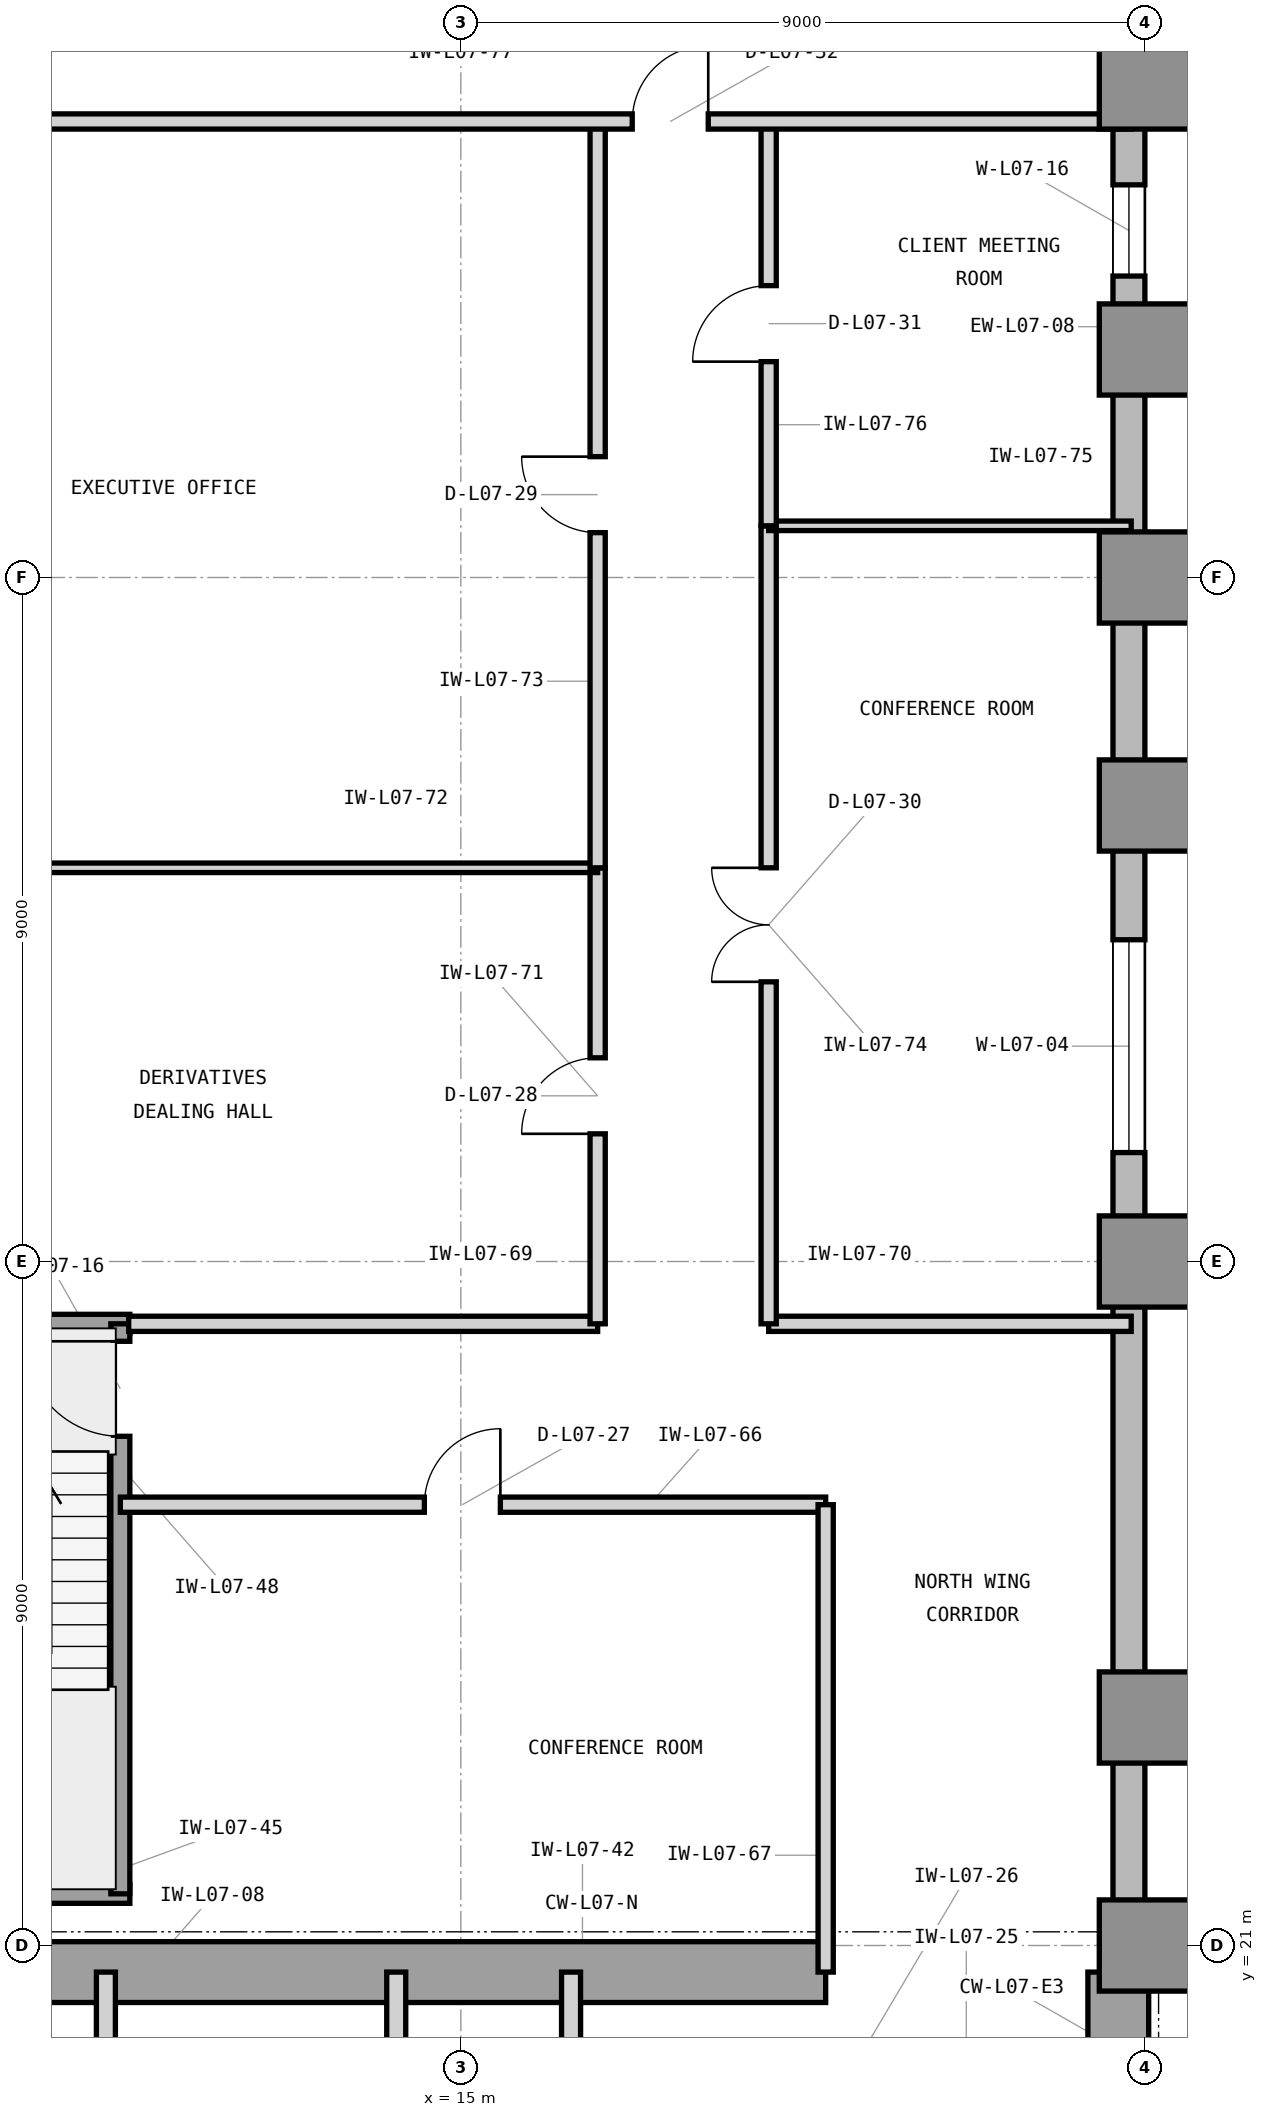
"""IFC4 building model, lengths in metres.
Left out: names, types, materials, properties, quantities, classifications, styles, units other than length and angle.
Written with IfcOpenShell. Run it as: python <this file> out.ifc"""

import sys

from ifc_helpers import new_model, si_unit, direction, frame, frame_2d, origin, origin_2d, place, context, subcontext, project, spatial, rectangle, extrude, element, fill, save


model = new_model("IFC4")
c1 = context("Model", 3, precision=1e-05, world=origin(), true_north=direction((0.0, 1.0)))
c2 = subcontext(c1, "Body", "Model", "MODEL_VIEW")
j1 = project(units=[si_unit("LENGTHUNIT", "METRE"), si_unit("PLANEANGLEUNIT", "RADIAN")], contexts=[c1])
p1 = place(None, origin())
s1 = spatial("IfcSite", under=j1, at=p1, CompositionType="ELEMENT")
p2 = place(p1, origin())
s2 = spatial("IfcBuilding", under=s1, at=p2, CompositionType="ELEMENT")
p3 = place(p2, frame((0.0, 0.0, 34.2)))
s3 = spatial("IfcBuildingStorey", under=s2, at=p3, CompositionType="ELEMENT", Elevation=34.2)
p4 = place(p3, frame((7.475, 20.65, 0.0), z_axis=(0.0, 0.0, 1.0), x_axis=(1.0, 0.0, 0.0)))
e1 = element("IfcWall", 1, at=p4, inside=s3, PredefinedType="SHEAR", context=c2, shape_type="SweptSolid", body=[
    extrude(rectangle(XDim=12.325, YDim=0.8, at=frame_2d((6.163, 0.0))), origin(), (0.0, 0.0, 1.0), 4.2),
])
p5 = place(p3, frame((23.65, 16.6, 0.0), z_axis=(0.0, 0.0, 1.0), x_axis=(0.0, 1.0, 0.0)))
e2 = element("IfcWall", 2, at=p5, inside=s3, PredefinedType="SHEAR", context=c2, shape_type="SweptSolid", body=[
    extrude(rectangle(XDim=4.05, YDim=0.8, at=frame_2d((2.025, 0.0))), origin(), (0.0, 0.0, 1.0), 4.2),
])
for number, where, z_axis, x_axis in (
    (3, (24.0, 21.0, 0.0), (0.0, 0.0, 1.0), (1.0, 0.0, 0.0)),
    (4, (24.0, 24.0, 0.0), (0.0, 0.0, 1.0), (1.0, 0.0, 0.0)),
    (5, (24.0, 30.0, 0.0), (0.0, 0.0, 1.0), (1.0, 0.0, 0.0)),
    (6, (24.0, 36.0, 0.0), (0.0, 0.0, 1.0), (1.0, 0.0, 0.0)),
    (7, (24.0, 39.0, 0.0), (0.0, 0.0, 1.0), (1.0, 0.0, 0.0)),
    (8, (24.0, 42.0, 0.0), (0.0, 0.0, 1.0), (1.0, 0.0, 0.0)),
    (9, (24.0, 45.5, 0.0), (0.0, 0.0, 1.0), (1.0, 0.0, 0.0)),
):
    element("IfcColumn", number, at=place(p3, frame(where, z_axis=z_axis, x_axis=x_axis)), inside=s3, PredefinedType="COLUMN", context=c2, shape_type="SweptSolid", body=[
        extrude(rectangle(XDim=1.2, YDim=1.2, at=origin_2d()), origin(), (0.0, 0.0, 1.0), 4.2),
    ])
p6 = place(p3, frame((64.4, 20.79, 0.0), z_axis=(0.0, 0.0, 1.0), x_axis=(-1.0, 0.0, 0.0)))
e10 = element("IfcWall", 10, at=p6, inside=s3, PredefinedType="STANDARD", context=c2, shape_type="SweptSolid", body=[
    extrude(rectangle(XDim=40.4, YDim=0.42, at=frame_2d((20.2, 0.0))), origin(), (0.0, 0.0, 1.0), 3.98),
])
p7 = place(p6, frame((26.375, 0.0, 0.85)))
e11 = element("IfcOpeningElement", 11, at=p7, cuts=e10, PredefinedType="OPENING", context=c2, shape_type="SweptSolid", body=[
    extrude(rectangle(XDim=2.8, YDim=2.45, at=frame_2d((1.4, 1.225))), frame((0.0, 0.22, 0.0), z_axis=(0.0, -1.0, 0.0), x_axis=(1.0, 0.0, 0.0)), (0.0, 0.0, 1.0), 0.44),
])
p8 = place(p6, frame((38.222, 0.0, 0.85)))
e12 = element("IfcOpeningElement", 12, at=p8, cuts=e10, PredefinedType="OPENING", context=c2, shape_type="SweptSolid", body=[
    extrude(rectangle(XDim=1.2, YDim=2.45, at=frame_2d((0.6, 1.225))), frame((0.0, 0.22, 0.0), z_axis=(0.0, -1.0, 0.0), x_axis=(1.0, 0.0, 0.0)), (0.0, 0.0, 1.0), 0.44),
])
p9 = place(p6, frame((32.536, 0.0, 0.85)))
e13 = element("IfcOpeningElement", 13, at=p9, cuts=e10, PredefinedType="OPENING", context=c2, shape_type="SweptSolid", body=[
    extrude(rectangle(XDim=2.8, YDim=2.45, at=frame_2d((1.4, 1.225))), frame((0.0, 0.22, 0.0), z_axis=(0.0, -1.0, 0.0), x_axis=(1.0, 0.0, 0.0)), (0.0, 0.0, 1.0), 0.44),
])
p10 = place(p6, frame((17.386, 0.0, 0.85)))
e14 = element("IfcOpeningElement", 14, at=p10, cuts=e10, PredefinedType="OPENING", context=c2, shape_type="SweptSolid", body=[
    extrude(rectangle(XDim=2.8, YDim=2.45, at=frame_2d((1.4, 1.225))), frame((0.0, 0.22, 0.0), z_axis=(0.0, -1.0, 0.0), x_axis=(1.0, 0.0, 0.0)), (0.0, 0.0, 1.0), 0.44),
])
p11 = place(p6, frame((8.436, 0.0, 0.85)))
e15 = element("IfcOpeningElement", 15, at=p11, cuts=e10, PredefinedType="OPENING", context=c2, shape_type="SweptSolid", body=[
    extrude(rectangle(XDim=1.2, YDim=2.45, at=frame_2d((0.6, 1.225))), frame((0.0, 0.22, 0.0), z_axis=(0.0, -1.0, 0.0), x_axis=(1.0, 0.0, 0.0)), (0.0, 0.0, 1.0), 0.44),
])
p12 = place(p3, frame((23.79, 21.0, 0.0), z_axis=(0.0, 0.0, 1.0), x_axis=(0.0, 1.0, 0.0)))
e16 = element("IfcWall", 16, at=p12, inside=s3, PredefinedType="STANDARD", context=c2, shape_type="SweptSolid", body=[
    extrude(rectangle(XDim=28.4, YDim=0.42, at=frame_2d((14.2, 0.0))), origin(), (0.0, 0.0, 1.0), 3.98),
])
p13 = place(p12, frame((10.433, 0.0, 0.85)))
e17 = element("IfcOpeningElement", 17, at=p13, cuts=e16, PredefinedType="OPENING", context=c2, shape_type="SweptSolid", body=[
    extrude(rectangle(XDim=2.8, YDim=2.45, at=frame_2d((1.4, 1.225))), frame((0.0, 0.22, 0.0), z_axis=(0.0, -1.0, 0.0), x_axis=(1.0, 0.0, 0.0)), (0.0, 0.0, 1.0), 0.44),
])
p14 = place(p12, frame((21.966, 0.0, 0.85)))
e18 = element("IfcOpeningElement", 18, at=p14, cuts=e16, PredefinedType="OPENING", context=c2, shape_type="SweptSolid", body=[
    extrude(rectangle(XDim=1.2, YDim=2.45, at=frame_2d((0.6, 1.225))), frame((0.0, 0.22, 0.0), z_axis=(0.0, -1.0, 0.0), x_axis=(1.0, 0.0, 0.0)), (0.0, 0.0, 1.0), 0.44),
])
p15 = place(p3, frame((10.33, 19.45, 0.0), z_axis=(0.0, 0.0, 1.0), x_axis=(0.0, 1.0, 0.0)))
e19 = element("IfcWall", 19, at=p15, inside=s3, PredefinedType="PARTITIONING", context=c2, shape_type="SweptSolid", body=[
    extrude(rectangle(XDim=1.2, YDim=0.25, at=frame_2d((0.6, 0.0))), origin(), (0.0, 0.0, 1.0), 3.114),
])
for number, where, z_axis, x_axis in (
    (20, (14.15, 16.7, 0.0), (0.0, 0.0, 1.0), (0.0, 1.0, 0.0)),
    (21, (16.45, 16.7, 0.0), (0.0, 0.0, 1.0), (0.0, 1.0, 0.0)),
):
    element("IfcWall", number, at=place(p3, frame(where, z_axis=z_axis, x_axis=x_axis)), inside=s3, PredefinedType="PARTITIONING", context=c2, shape_type="SweptSolid", body=[
        extrude(rectangle(XDim=3.95, YDim=0.25, at=frame_2d((1.975, 0.0))), origin(), (0.0, 0.0, 1.0), 3.97),
    ])
for number, where, z_axis, x_axis in (
    (22, (6.555, 21.68, 0.0), (0.0, 0.0, 1.0), (1.0, 0.0, 0.0)),
    (23, (6.555, 29.18, 0.0), (0.0, 0.0, 1.0), (1.0, 0.0, 0.0)),
):
    element("IfcWall", number, at=place(p3, frame(where, z_axis=z_axis, x_axis=x_axis)), inside=s3, PredefinedType="SHEAR", context=c2, shape_type="SweptSolid", body=[
        extrude(rectangle(XDim=4.09, YDim=0.25, at=frame_2d((2.045, 0.0))), origin(), (0.0, 0.0, 1.0), 4.2),
    ])
p16 = place(p3, frame((10.52, 21.68, 0.0), z_axis=(0.0, 0.0, 1.0), x_axis=(0.0, 1.0, 0.0)))
e24 = element("IfcWall", 24, at=p16, inside=s3, PredefinedType="SHEAR", context=c2, shape_type="SweptSolid", body=[
    extrude(rectangle(XDim=7.5, YDim=0.25, at=frame_2d((3.75, 0.0))), origin(), (0.0, 0.0, 1.0), 4.2),
])
p17 = place(p16, frame((6.02, 0.0, 0.0)))
e25 = element("IfcOpeningElement", 25, at=p17, cuts=e24, PredefinedType="OPENING", context=c2, shape_type="SweptSolid", body=[
    extrude(rectangle(XDim=1.25, YDim=2.2, at=frame_2d((0.625, 1.1))), frame((0.0, 0.135, 0.0), z_axis=(0.0, -1.0, 0.0), x_axis=(1.0, 0.0, 0.0)), (0.0, 0.0, 1.0), 0.27),
])
p18 = place(p3, frame((10.52, 26.8, 0.0), z_axis=(0.0, 0.0, 1.0), x_axis=(1.0, 0.0, 0.0)))
e26 = element("IfcWall", 26, at=p18, inside=s3, PredefinedType="PARTITIONING", context=c2, shape_type="SweptSolid", body=[
    extrude(rectangle(XDim=9.28, YDim=0.2, at=frame_2d((4.64, 0.0))), origin(), (0.0, 0.0, 1.0), 3.97),
])
p19 = place(p18, frame((4.0, 0.0, 0.0)))
e27 = element("IfcOpeningElement", 27, at=p19, cuts=e26, PredefinedType="OPENING", context=c2, shape_type="SweptSolid", body=[
    extrude(rectangle(XDim=1.0, YDim=2.15, at=frame_2d((0.5, 1.075))), frame((0.0, 0.11, 0.0), z_axis=(0.0, -1.0, 0.0), x_axis=(1.0, 0.0, 0.0)), (0.0, 0.0, 1.0), 0.22),
])
p20 = place(p3, frame((19.8, 20.65, 0.0), z_axis=(0.0, 0.0, 1.0), x_axis=(0.0, 1.0, 0.0)))
e28 = element("IfcWall", 28, at=p20, inside=s3, PredefinedType="PARTITIONING", context=c2, shape_type="SweptSolid", body=[
    extrude(rectangle(XDim=6.15, YDim=0.2, at=frame_2d((3.075, 0.0))), origin(), (0.0, 0.0, 1.0), 3.97),
])
p21 = place(p3, frame((10.63, 29.18, 0.0), z_axis=(0.0, 0.0, 1.0), x_axis=(1.0, 0.0, 0.0)))
e29 = element("IfcWall", 29, at=p21, inside=s3, PredefinedType="PARTITIONING", context=c2, shape_type="SweptSolid", body=[
    extrude(rectangle(XDim=6.17, YDim=0.2, at=frame_2d((3.085, 0.0))), origin(), (0.0, 0.0, 1.0), 3.97),
])
p22 = place(p3, frame((19.05, 29.18, 0.0), z_axis=(0.0, 0.0, 1.0), x_axis=(1.0, 0.0, 0.0)))
e30 = element("IfcWall", 30, at=p22, inside=s3, PredefinedType="PARTITIONING", context=c2, shape_type="SweptSolid", body=[
    extrude(rectangle(XDim=4.77, YDim=0.2, at=frame_2d((2.385, 0.0))), origin(), (0.0, 0.0, 1.0), 3.97),
])
p23 = place(p3, frame((16.8, 29.18, 0.0), z_axis=(0.0, 0.0, 1.0), x_axis=(0.0, 1.0, 0.0)))
e31 = element("IfcWall", 31, at=p23, inside=s3, PredefinedType="PARTITIONING", context=c2, shape_type="SweptSolid", body=[
    extrude(rectangle(XDim=6.0, YDim=0.2, at=frame_2d((3.0, 0.0))), origin(), (0.0, 0.0, 1.0), 3.97),
])
p24 = place(p23, frame((2.5, 0.0, 0.0)))
e32 = element("IfcOpeningElement", 32, at=p24, cuts=e31, PredefinedType="OPENING", context=c2, shape_type="SweptSolid", body=[
    extrude(rectangle(XDim=1.0, YDim=2.15, at=frame_2d((0.5, 1.075))), frame((0.0, 0.11, 0.0), z_axis=(0.0, -1.0, 0.0), x_axis=(1.0, 0.0, 0.0)), (0.0, 0.0, 1.0), 0.22),
])
p25 = place(p3, frame((6.18, 35.18, 0.0), z_axis=(0.0, 0.0, 1.0), x_axis=(1.0, 0.0, 0.0)))
e33 = element("IfcWall", 33, at=p25, inside=s3, PredefinedType="PARTITIONING", context=c2, shape_type="SweptSolid", body=[
    extrude(rectangle(XDim=10.62, YDim=0.125, at=frame_2d((5.31, 0.0))), origin(), (0.0, 0.0, 1.0), 3.97),
])
p26 = place(p3, frame((16.8, 35.18, 0.0), z_axis=(0.0, 0.0, 1.0), x_axis=(0.0, 1.0, 0.0)))
e34 = element("IfcWall", 34, at=p26, inside=s3, PredefinedType="PARTITIONING", context=c2, shape_type="SweptSolid", body=[
    extrude(rectangle(XDim=9.82, YDim=0.2, at=frame_2d((4.91, 0.0))), origin(), (0.0, 0.0, 1.0), 3.97),
])
p27 = place(p26, frame((4.41, 0.0, 0.0)))
e35 = element("IfcOpeningElement", 35, at=p27, cuts=e34, PredefinedType="OPENING", context=c2, shape_type="SweptSolid", body=[
    extrude(rectangle(XDim=1.0, YDim=2.15, at=frame_2d((0.5, 1.075))), frame((0.0, 0.11, 0.0), z_axis=(0.0, -1.0, 0.0), x_axis=(1.0, 0.0, 0.0)), (0.0, 0.0, 1.0), 0.22),
])
p28 = place(p3, frame((19.05, 29.18, 0.0), z_axis=(0.0, 0.0, 1.0), x_axis=(0.0, 1.0, 0.0)))
e36 = element("IfcWall", 36, at=p28, inside=s3, PredefinedType="PARTITIONING", context=c2, shape_type="SweptSolid", body=[
    extrude(rectangle(XDim=10.5, YDim=0.2, at=frame_2d((5.25, 0.0))), origin(), (0.0, 0.0, 1.0), 3.97),
])
p29 = place(p28, frame((4.5, 0.0, 0.0)))
e37 = element("IfcOpeningElement", 37, at=p29, cuts=e36, PredefinedType="OPENING", context=c2, shape_type="SweptSolid", body=[
    extrude(rectangle(XDim=1.5, YDim=2.3, at=frame_2d((0.75, 1.15))), frame((0.0, 0.11, 0.0), z_axis=(0.0, -1.0, 0.0), x_axis=(1.0, 0.0, 0.0)), (0.0, 0.0, 1.0), 0.22),
])
p30 = place(p3, frame((19.05, 39.68, 0.0), z_axis=(0.0, 0.0, 1.0), x_axis=(1.0, 0.0, 0.0)))
e38 = element("IfcWall", 38, at=p30, inside=s3, PredefinedType="PARTITIONING", context=c2, shape_type="SweptSolid", body=[
    extrude(rectangle(XDim=4.77, YDim=0.125, at=frame_2d((2.385, 0.0))), origin(), (0.0, 0.0, 1.0), 3.97),
])
p31 = place(p3, frame((19.05, 39.68, 0.0), z_axis=(0.0, 0.0, 1.0), x_axis=(0.0, 1.0, 0.0)))
e39 = element("IfcWall", 39, at=p31, inside=s3, PredefinedType="PARTITIONING", context=c2, shape_type="SweptSolid", body=[
    extrude(rectangle(XDim=5.32, YDim=0.2, at=frame_2d((2.66, 0.0))), origin(), (0.0, 0.0, 1.0), 3.97),
])
p32 = place(p31, frame((2.16, 0.0, 0.0)))
e40 = element("IfcOpeningElement", 40, at=p32, cuts=e39, PredefinedType="OPENING", context=c2, shape_type="SweptSolid", body=[
    extrude(rectangle(XDim=1.0, YDim=2.15, at=frame_2d((0.5, 1.075))), frame((0.0, 0.11, 0.0), z_axis=(0.0, -1.0, 0.0), x_axis=(1.0, 0.0, 0.0)), (0.0, 0.0, 1.0), 0.22),
])
p33 = place(p3, frame((6.18, 45.0, 0.0), z_axis=(0.0, 0.0, 1.0), x_axis=(1.0, 0.0, 0.0)))
e41 = element("IfcWall", 41, at=p33, inside=s3, PredefinedType="PARTITIONING", context=c2, shape_type="SweptSolid", body=[
    extrude(rectangle(XDim=17.64, YDim=0.2, at=frame_2d((8.82, 0.0))), origin(), (0.0, 0.0, 1.0), 3.97),
])
p34 = place(p33, frame((11.075, 0.0, 0.0)))
e42 = element("IfcOpeningElement", 42, at=p34, cuts=e41, PredefinedType="OPENING", context=c2, shape_type="SweptSolid", body=[
    extrude(rectangle(XDim=1.0, YDim=2.15, at=frame_2d((0.5, 1.075))), frame((0.0, 0.11, 0.0), z_axis=(0.0, -1.0, 0.0), x_axis=(1.0, 0.0, 0.0)), (0.0, 0.0, 1.0), 0.22),
])
p35 = place(p13, origin())
e43 = element("IfcWindow", 43, at=p35, inside=s3, PartitioningType="SINGLE_PANEL", PredefinedType="WINDOW", context=c2, shape_type="SweptSolid", body=[
    extrude(rectangle(XDim=2.8, YDim=2.45, at=frame_2d((1.4, 1.225))), frame((0.0, 0.11, 0.0), z_axis=(0.0, -1.0, 0.0), x_axis=(1.0, 0.0, 0.0)), (0.0, 0.0, 1.0), 0.06),
])
fill(e17, e43)
p36 = place(p17, origin())
e44 = element("IfcDoor", 44, at=p36, inside=s3, OperationType="SINGLE_SWING_RIGHT", PredefinedType="DOOR", context=c2, shape_type="SweptSolid", body=[
    extrude(rectangle(XDim=1.25, YDim=2.2, at=frame_2d((0.625, 1.1))), frame((0.0, 0.025, 0.0), z_axis=(0.0, -1.0, 0.0), x_axis=(1.0, 0.0, 0.0)), (0.0, 0.0, 1.0), 0.05),
])
fill(e25, e44)
p37 = place(p19, origin())
e45 = element("IfcDoor", 45, at=p37, inside=s3, OperationType="SINGLE_SWING_RIGHT", PredefinedType="DOOR", context=c2, shape_type="SweptSolid", body=[
    extrude(rectangle(XDim=1.0, YDim=2.15, at=frame_2d((0.5, 1.075))), frame((0.0, 0.025, 0.0), z_axis=(0.0, -1.0, 0.0), x_axis=(1.0, 0.0, 0.0)), (0.0, 0.0, 1.0), 0.05),
])
fill(e27, e45)
p38 = place(p24, origin())
e46 = element("IfcDoor", 46, at=p38, inside=s3, OperationType="SINGLE_SWING_LEFT", PredefinedType="DOOR", context=c2, shape_type="SweptSolid", body=[
    extrude(rectangle(XDim=1.0, YDim=2.15, at=frame_2d((0.5, 1.075))), frame((0.0, 0.025, 0.0), z_axis=(0.0, -1.0, 0.0), x_axis=(1.0, 0.0, 0.0)), (0.0, 0.0, 1.0), 0.05),
])
fill(e32, e46)
p39 = place(p27, origin())
e47 = element("IfcDoor", 47, at=p39, inside=s3, OperationType="SINGLE_SWING_RIGHT", PredefinedType="DOOR", context=c2, shape_type="SweptSolid", body=[
    extrude(rectangle(XDim=1.0, YDim=2.15, at=frame_2d((0.5, 1.075))), frame((0.0, 0.025, 0.0), z_axis=(0.0, -1.0, 0.0), x_axis=(1.0, 0.0, 0.0)), (0.0, 0.0, 1.0), 0.05),
])
fill(e35, e47)
p40 = place(p29, origin())
e48 = element("IfcDoor", 48, at=p40, inside=s3, OperationType="DOUBLE_DOOR_SINGLE_SWING", PredefinedType="DOOR", context=c2, shape_type="SweptSolid", body=[
    extrude(rectangle(XDim=1.5, YDim=2.3, at=frame_2d((0.75, 1.15))), frame((0.0, 0.025, 0.0), z_axis=(0.0, -1.0, 0.0), x_axis=(1.0, 0.0, 0.0)), (0.0, 0.0, 1.0), 0.05),
])
fill(e37, e48)
p41 = place(p32, origin())
e49 = element("IfcDoor", 49, at=p41, inside=s3, OperationType="SINGLE_SWING_LEFT", PredefinedType="DOOR", context=c2, shape_type="SweptSolid", body=[
    extrude(rectangle(XDim=1.0, YDim=2.15, at=frame_2d((0.5, 1.075))), frame((0.0, 0.025, 0.0), z_axis=(0.0, -1.0, 0.0), x_axis=(1.0, 0.0, 0.0)), (0.0, 0.0, 1.0), 0.05),
])
fill(e40, e49)
p42 = place(p34, origin())
e50 = element("IfcDoor", 50, at=p42, inside=s3, OperationType="SINGLE_SWING_RIGHT", PredefinedType="DOOR", context=c2, shape_type="SweptSolid", body=[
    extrude(rectangle(XDim=1.0, YDim=2.15, at=frame_2d((0.5, 1.075))), frame((0.0, 0.025, 0.0), z_axis=(0.0, -1.0, 0.0), x_axis=(1.0, 0.0, 0.0)), (0.0, 0.0, 1.0), 0.05),
])
fill(e42, e50)
p43 = place(p14, origin())
e51 = element("IfcWindow", 51, at=p43, inside=s3, PartitioningType="SINGLE_PANEL", PredefinedType="WINDOW", context=c2, shape_type="SweptSolid", body=[
    extrude(rectangle(XDim=1.2, YDim=2.45, at=frame_2d((0.6, 1.225))), frame((0.0, 0.11, 0.0), z_axis=(0.0, -1.0, 0.0), x_axis=(1.0, 0.0, 0.0)), (0.0, 0.0, 1.0), 0.06),
])
fill(e18, e51)
save(model, sys.argv[1])
